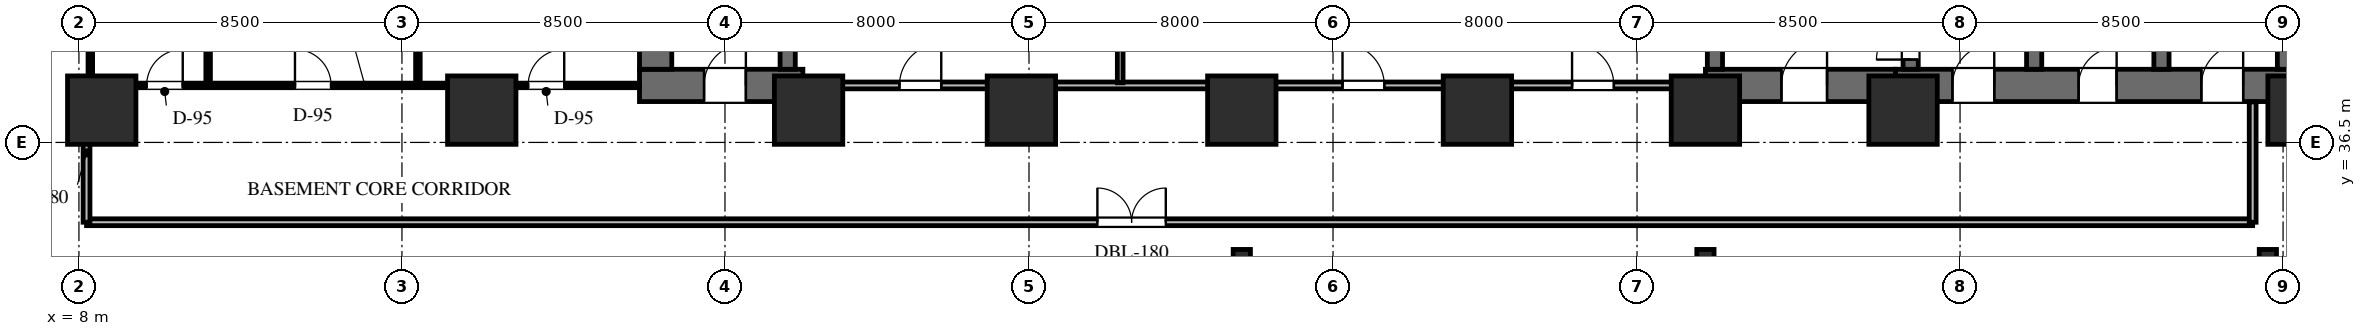
"""IFC4 building model, lengths in metres.
Left out: names, types, materials, properties, quantities, classifications, styles, units other than length and angle.
Written with IfcOpenShell. Run it as: python <this file> out.ifc"""

import sys

from ifc_helpers import new_model, si_unit, direction, frame, frame_2d, origin, origin_2d, place, context, subcontext, project, spatial, rectangle, i_section, extrude, element, fill, save


model = new_model("IFC4")
c1 = context("Model", 3, precision=1e-05, world=origin(), true_north=direction((0.0, 1.0)))
c2 = subcontext(c1, "Body", "Model", "MODEL_VIEW")
j1 = project(units=[si_unit("LENGTHUNIT", "METRE"), si_unit("PLANEANGLEUNIT", "RADIAN")], contexts=[c1])
p1 = place(None, origin())
s1 = spatial("IfcSite", under=j1, at=p1, CompositionType="ELEMENT")
p2 = place(p1, origin())
s2 = spatial("IfcBuilding", under=s1, at=p2, CompositionType="ELEMENT")
p3 = place(p2, frame((0.0, 0.0, -8.4)))
s3 = spatial("IfcBuildingStorey", under=s2, at=p3, CompositionType="ELEMENT", Elevation=-8.4)
p4 = place(p3, frame((55.8, 38.0, 0.0), z_axis=(0.0, 0.0, 1.0), x_axis=(1.0, 0.0, 0.0)))
e1 = element("IfcWall", 1, at=p4, inside=s3, PredefinedType="SHEAR", context=c2, shape_type="SweptSolid", body=[
    extrude(rectangle(XDim=10.9, YDim=0.85, at=frame_2d((5.45, 0.0))), origin(), (0.0, 0.0, 1.0), 4.2),
])
p5 = place(p4, frame((1.5, 0.0, 0.0)))
e2 = element("IfcOpeningElement", 2, at=p5, cuts=e1, PredefinedType="OPENING", context=c2, shape_type="SweptSolid", body=[
    extrude(rectangle(XDim=1.1, YDim=2.2, at=frame_2d((0.55, 1.1))), frame((0.0, 0.435, 0.0), z_axis=(0.0, -1.0, 0.0), x_axis=(1.0, 0.0, 0.0)), (0.0, 0.0, 1.0), 0.87),
])
p6 = place(p4, frame((4.82, 0.0, 0.0)))
e3 = element("IfcOpeningElement", 3, at=p6, cuts=e1, PredefinedType="OPENING", context=c2, shape_type="SweptSolid", body=[
    extrude(rectangle(XDim=1.0, YDim=2.15, at=frame_2d((0.5, 1.075))), frame((0.0, 0.435, 0.0), z_axis=(0.0, -1.0, 0.0), x_axis=(1.0, 0.0, 0.0)), (0.0, 0.0, 1.0), 0.87),
])
p7 = place(p4, frame((8.05, 0.0, 0.0)))
e4 = element("IfcOpeningElement", 4, at=p7, cuts=e1, PredefinedType="OPENING", context=c2, shape_type="SweptSolid", body=[
    extrude(rectangle(XDim=1.1, YDim=2.2, at=frame_2d((0.55, 1.1))), frame((0.0, 0.435, 0.0), z_axis=(0.0, -1.0, 0.0), x_axis=(1.0, 0.0, 0.0)), (0.0, 0.0, 1.0), 0.87),
])
p8 = place(p3, frame((66.275, 38.425, 0.0), z_axis=(0.0, 0.0, 1.0), x_axis=(0.0, 1.0, 0.0)))
e5 = element("IfcWall", 5, at=p8, inside=s3, PredefinedType="SHEAR", context=c2, shape_type="SweptSolid", body=[
    extrude(rectangle(XDim=8.325, YDim=0.85, at=frame_2d((4.163, 0.0))), origin(), (0.0, 0.0, 1.0), 4.2),
])
for number, where, z_axis, x_axis in (
    (6, (62.8, 38.425, 0.0), (0.0, 0.0, 1.0), (0.0, 1.0, 0.0)),
    (7, (59.45, 38.425, 0.0), (0.0, 0.0, 1.0), (0.0, 1.0, 0.0)),
):
    element("IfcWall", number, at=place(p3, frame(where, z_axis=z_axis, x_axis=x_axis)), inside=s3, PredefinedType="SHEAR", context=c2, shape_type="SweptSolid", body=[
        extrude(rectangle(XDim=8.325, YDim=0.4, at=frame_2d((4.163, 0.0))), origin(), (0.0, 0.0, 1.0), 4.2),
    ])
p9 = place(p3, frame((56.2, 38.425, 0.0), z_axis=(0.0, 0.0, 1.0), x_axis=(0.0, 1.0, 0.0)))
e8 = element("IfcWall", 8, at=p9, inside=s3, PredefinedType="SHEAR", context=c2, shape_type="SweptSolid", body=[
    extrude(rectangle(XDim=8.325, YDim=0.4, at=frame_2d((4.163, 0.0))), origin(), (0.0, 0.0, 1.0), 4.2),
])
p10 = place(p9, frame((0.255, 0.0, 0.0)))
e9 = element("IfcOpeningElement", 9, at=p10, cuts=e8, PredefinedType="OPENING", context=c2, shape_type="SweptSolid", body=[
    extrude(rectangle(XDim=0.9, YDim=2.15, at=frame_2d((0.45, 1.075))), frame((0.0, 0.21, 0.0), z_axis=(0.0, -1.0, 0.0), x_axis=(1.0, 0.0, 0.0)), (0.0, 0.0, 1.0), 0.42),
])
p11 = place(p3, frame((50.8, 38.0, 0.0), z_axis=(0.0, 0.0, 1.0), x_axis=(1.0, 0.0, 0.0)))
e10 = element("IfcWall", 10, at=p11, inside=s3, PredefinedType="SHEAR", context=c2, shape_type="SweptSolid", body=[
    extrude(rectangle(XDim=5.0, YDim=0.85, at=frame_2d((2.5, 0.0))), origin(), (0.0, 0.0, 1.0), 4.2),
])
p12 = place(p11, frame((2.0, 0.0, 0.0)))
e11 = element("IfcOpeningElement", 11, at=p12, cuts=e10, PredefinedType="OPENING", context=c2, shape_type="SweptSolid", body=[
    extrude(rectangle(XDim=1.2, YDim=2.2, at=frame_2d((0.6, 1.1))), frame((0.0, 0.435, 0.0), z_axis=(0.0, -1.0, 0.0), x_axis=(1.0, 0.0, 0.0)), (0.0, 0.0, 1.0), 0.87),
])
p13 = place(p3, frame((51.05, 38.425, 0.0), z_axis=(0.0, 0.0, 1.0), x_axis=(0.0, 1.0, 0.0)))
e12 = element("IfcWall", 12, at=p13, inside=s3, PredefinedType="SHEAR", context=c2, shape_type="SweptSolid", body=[
    extrude(rectangle(XDim=8.325, YDim=0.4, at=frame_2d((4.163, 0.0))), origin(), (0.0, 0.0, 1.0), 4.2),
])
p14 = place(p3, frame((22.75, 38.0, 0.0), z_axis=(0.0, 0.0, 1.0), x_axis=(1.0, 0.0, 0.0)))
e13 = element("IfcWall", 13, at=p14, inside=s3, PredefinedType="SHEAR", context=c2, shape_type="SweptSolid", body=[
    extrude(rectangle(XDim=4.3, YDim=0.85, at=frame_2d((2.15, 0.0))), origin(), (0.0, 0.0, 1.0), 4.2),
])
p15 = place(p14, frame((1.7, 0.0, 0.0)))
e14 = element("IfcOpeningElement", 14, at=p15, cuts=e13, PredefinedType="OPENING", context=c2, shape_type="SweptSolid", body=[
    extrude(rectangle(XDim=1.1, YDim=2.2, at=frame_2d((0.55, 1.1))), frame((0.0, 0.435, 0.0), z_axis=(0.0, -1.0, 0.0), x_axis=(1.0, 0.0, 0.0)), (0.0, 0.0, 1.0), 0.87),
])
p16 = place(p3, frame((23.175, 38.425, 0.0), z_axis=(0.0, 0.0, 1.0), x_axis=(0.0, 1.0, 0.0)))
e15 = element("IfcWall", 15, at=p16, inside=s3, PredefinedType="SHEAR", context=c2, shape_type="SweptSolid", body=[
    extrude(rectangle(XDim=8.325, YDim=0.85, at=frame_2d((4.163, 0.0))), origin(), (0.0, 0.0, 1.0), 4.2),
])
p17 = place(p3, frame((26.65, 38.425, 0.0), z_axis=(0.0, 0.0, 1.0), x_axis=(0.0, 1.0, 0.0)))
e16 = element("IfcWall", 16, at=p17, inside=s3, PredefinedType="SHEAR", context=c2, shape_type="SweptSolid", body=[
    extrude(rectangle(XDim=8.325, YDim=0.4, at=frame_2d((4.163, 0.0))), origin(), (0.0, 0.0, 1.0), 4.2),
])
for number, where, z_axis, x_axis in (
    (17, (38.6, 33.4, 0.0), (0.0, 0.0, 1.0), (1.0, 0.0, 0.0)),
    (18, (50.8, 33.4, 0.0), (0.0, 0.0, 1.0), (1.0, 0.0, 0.0)),
    (19, (65.6, 33.4, 0.0), (0.0, 0.0, 1.0), (1.0, 0.0, 0.0)),
):
    element("IfcColumn", number, at=place(p3, frame(where, z_axis=z_axis, x_axis=x_axis)), inside=s3, PredefinedType="COLUMN", context=c2, shape_type="SweptSolid", body=[
        extrude(i_section(OverallWidth=0.454, OverallDepth=0.569, WebThickness=0.078, FlangeThickness=0.125, FilletRadius=0.03, at=origin_2d()), origin(), (0.0, 0.0, 1.0), 4.2),
    ])
for number, where, z_axis, x_axis in (
    (20, (66.5, 37.35, 0.0), (0.0, 0.0, 1.0), (1.0, 0.0, 0.0)),
    (21, (56.0, 37.35, 0.0), (0.0, 0.0, 1.0), (1.0, 0.0, 0.0)),
    (22, (50.8, 37.35, 0.0), (0.0, 0.0, 1.0), (1.0, 0.0, 0.0)),
    (23, (44.8, 37.35, 0.0), (0.0, 0.0, 1.0), (1.0, 0.0, 0.0)),
    (24, (38.6, 37.35, 0.0), (0.0, 0.0, 1.0), (1.0, 0.0, 0.0)),
    (25, (32.8, 37.35, 0.0), (0.0, 0.0, 1.0), (1.0, 0.0, 0.0)),
    (26, (27.2, 37.35, 0.0), (0.0, 0.0, 1.0), (1.0, 0.0, 0.0)),
    (27, (18.6, 37.35, 0.0), (0.0, 0.0, 1.0), (1.0, 0.0, 0.0)),
    (28, (8.6, 37.35, 0.0), (0.0, 0.0, 1.0), (1.0, 0.0, 0.0)),
):
    element("IfcColumn", number, at=place(p3, frame(where, z_axis=z_axis, x_axis=x_axis)), inside=s3, PredefinedType="COLUMN", context=c2, shape_type="SweptSolid", body=[
        extrude(rectangle(XDim=1.8, YDim=1.8, at=origin_2d()), origin(), (0.0, 0.0, 1.0), 4.2),
    ])
p18 = place(p3, frame((45.05, 38.0, 0.0), z_axis=(0.0, 0.0, 1.0), x_axis=(1.0, 0.0, 0.0)))
e29 = element("IfcWall", 29, at=p18, inside=s3, PredefinedType="STANDARD", context=c2, shape_type="SweptSolid", body=[
    extrude(rectangle(XDim=5.75, YDim=0.18, at=frame_2d((2.875, 0.0))), origin(), (0.0, 0.0, 1.0), 2.952),
])
p19 = place(p18, frame((2.24, 0.0, 0.0)))
e30 = element("IfcOpeningElement", 30, at=p19, cuts=e29, PredefinedType="OPENING", context=c2, shape_type="SweptSolid", body=[
    extrude(rectangle(XDim=1.1, YDim=2.2, at=frame_2d((0.55, 1.1))), frame((0.0, 0.1, 0.0), z_axis=(0.0, -1.0, 0.0), x_axis=(1.0, 0.0, 0.0)), (0.0, 0.0, 1.0), 0.2),
])
p20 = place(p3, frame((27.05, 38.0, 0.0), z_axis=(0.0, 0.0, 1.0), x_axis=(1.0, 0.0, 0.0)))
e31 = element("IfcWall", 31, at=p20, inside=s3, PredefinedType="STANDARD", context=c2, shape_type="SweptSolid", body=[
    extrude(rectangle(XDim=18.0, YDim=0.18, at=frame_2d((9.0, 0.0))), origin(), (0.0, 0.0, 1.0), 2.952),
])
p21 = place(p20, frame((2.541, 0.0, 0.0)))
e32 = element("IfcOpeningElement", 32, at=p21, cuts=e31, PredefinedType="OPENING", context=c2, shape_type="SweptSolid", body=[
    extrude(rectangle(XDim=1.1, YDim=2.2, at=frame_2d((0.55, 1.1))), frame((0.0, 0.1, 0.0), z_axis=(0.0, -1.0, 0.0), x_axis=(1.0, 0.0, 0.0)), (0.0, 0.0, 1.0), 0.2),
])
p22 = place(p20, frame((14.2, 0.0, 0.0)))
e33 = element("IfcOpeningElement", 33, at=p22, cuts=e31, PredefinedType="OPENING", context=c2, shape_type="SweptSolid", body=[
    extrude(rectangle(XDim=1.1, YDim=2.2, at=frame_2d((0.55, 1.1))), frame((0.0, 0.1, 0.0), z_axis=(0.0, -1.0, 0.0), x_axis=(1.0, 0.0, 0.0)), (0.0, 0.0, 1.0), 0.2),
])
p23 = place(p3, frame((35.4, 38.068, 0.0), z_axis=(0.0, 0.0, 1.0), x_axis=(0.0, 1.0, 0.0)))
e34 = element("IfcWall", 34, at=p23, inside=s3, PredefinedType="PARTITIONING", context=c2, shape_type="SweptSolid", body=[
    extrude(rectangle(XDim=5.774, YDim=0.15, at=frame_2d((2.887, 0.0))), origin(), (0.0, 0.0, 1.0), 3.9),
])
p24 = place(p3, frame((8.2, 34.4, 0.0), z_axis=(0.0, 0.0, 1.0), x_axis=(1.0, 0.0, 0.0)))
e35 = element("IfcWall", 35, at=p24, inside=s3, PredefinedType="STANDARD", context=c2, shape_type="SweptSolid", body=[
    extrude(rectangle(XDim=57.0, YDim=0.18, at=frame_2d((28.5, 0.0))), origin(), (0.0, 0.0, 1.0), 2.952),
])
p25 = place(p24, frame((26.6, 0.0, 0.0)))
e36 = element("IfcOpeningElement", 36, at=p25, cuts=e35, PredefinedType="OPENING", context=c2, shape_type="SweptSolid", body=[
    extrude(rectangle(XDim=1.8, YDim=2.2, at=frame_2d((0.9, 1.1))), frame((0.0, 0.1, 0.0), z_axis=(0.0, -1.0, 0.0), x_axis=(1.0, 0.0, 0.0)), (0.0, 0.0, 1.0), 0.2),
])
p26 = place(p3, frame((8.2, 34.4, 0.0), z_axis=(0.0, 0.0, 1.0), x_axis=(0.0, 1.0, 0.0)))
e37 = element("IfcWall", 37, at=p26, inside=s3, PredefinedType="STANDARD", context=c2, shape_type="SweptSolid", body=[
    extrude(rectangle(XDim=3.65, YDim=0.18, at=frame_2d((1.825, 0.0))), origin(), (0.0, 0.0, 1.0), 2.952),
])
p27 = place(p3, frame((65.2, 34.4, 0.0), z_axis=(0.0, 0.0, 1.0), x_axis=(0.0, 1.0, 0.0)))
e38 = element("IfcWall", 38, at=p27, inside=s3, PredefinedType="STANDARD", context=c2, shape_type="SweptSolid", body=[
    extrude(rectangle(XDim=3.167, YDim=0.18, at=frame_2d((1.583, 0.0))), origin(), (0.0, 0.0, 1.0), 2.952),
])
p28 = place(p3, frame((8.3, 38.0, 0.0), z_axis=(0.0, 0.0, 1.0), x_axis=(1.0, 0.0, 0.0)))
e39 = element("IfcWall", 39, at=p28, inside=s3, PredefinedType="PARTITIONING", context=c2, shape_type="SweptSolid", body=[
    extrude(rectangle(XDim=14.45, YDim=0.12, at=frame_2d((7.225, 0.0))), origin(), (0.0, 0.0, 1.0), 2.952),
])
p29 = place(p28, frame((1.482, 0.0, 0.0)))
e40 = element("IfcOpeningElement", 40, at=p29, cuts=e39, PredefinedType="OPENING", context=c2, shape_type="SweptSolid", body=[
    extrude(rectangle(XDim=0.95, YDim=2.15, at=frame_2d((0.475, 1.075))), frame((0.0, 0.07, 0.0), z_axis=(0.0, -1.0, 0.0), x_axis=(1.0, 0.0, 0.0)), (0.0, 0.0, 1.0), 0.14),
])
p30 = place(p28, frame((5.385, 0.0, 0.0)))
e41 = element("IfcOpeningElement", 41, at=p30, cuts=e39, PredefinedType="OPENING", context=c2, shape_type="SweptSolid", body=[
    extrude(rectangle(XDim=0.95, YDim=2.15, at=frame_2d((0.475, 1.075))), frame((0.0, 0.07, 0.0), z_axis=(0.0, -1.0, 0.0), x_axis=(1.0, 0.0, 0.0)), (0.0, 0.0, 1.0), 0.14),
])
p31 = place(p28, frame((11.52, 0.0, 0.0)))
e42 = element("IfcOpeningElement", 42, at=p31, cuts=e39, PredefinedType="OPENING", context=c2, shape_type="SweptSolid", body=[
    extrude(rectangle(XDim=0.95, YDim=2.15, at=frame_2d((0.475, 1.075))), frame((0.0, 0.07, 0.0), z_axis=(0.0, -1.0, 0.0), x_axis=(1.0, 0.0, 0.0)), (0.0, 0.0, 1.0), 0.14),
])
p32 = place(p3, frame((8.3, 38.0, 0.0), z_axis=(0.0, 0.0, 1.0), x_axis=(0.0, 1.0, 0.0)))
e43 = element("IfcWall", 43, at=p32, inside=s3, PredefinedType="PARTITIONING", context=c2, shape_type="SweptSolid", body=[
    extrude(rectangle(XDim=10.8, YDim=0.12, at=frame_2d((5.4, 0.0))), origin(), (0.0, 0.0, 1.0), 2.952),
])
for number, where, z_axis, x_axis in (
    (44, (11.4, 38.068, 0.0), (0.0, 0.0, 1.0), (0.0, 1.0, 0.0)),
    (45, (16.92, 38.068, 0.0), (0.0, 0.0, 1.0), (0.0, 1.0, 0.0)),
):
    element("IfcWall", number, at=place(p3, frame(where, z_axis=z_axis, x_axis=x_axis)), inside=s3, PredefinedType="PARTITIONING", context=c2, shape_type="SweptSolid", body=[
        extrude(rectangle(XDim=10.664, YDim=0.12, at=frame_2d((5.332, 0.0))), origin(), (0.0, 0.0, 1.0), 2.952),
    ])
p33 = place(p5, origin())
e46 = element("IfcDoor", 46, at=p33, inside=s3, OperationType="SINGLE_SWING_RIGHT", PredefinedType="DOOR", context=c2, shape_type="SweptSolid", body=[
    extrude(rectangle(XDim=1.1, YDim=2.2, at=frame_2d((0.55, 1.1))), frame((0.0, 0.025, 0.0), z_axis=(0.0, -1.0, 0.0), x_axis=(1.0, 0.0, 0.0)), (0.0, 0.0, 1.0), 0.05),
])
fill(e2, e46)
p34 = place(p6, origin())
e47 = element("IfcDoor", 47, at=p34, inside=s3, OperationType="SINGLE_SWING_RIGHT", PredefinedType="DOOR", context=c2, shape_type="SweptSolid", body=[
    extrude(rectangle(XDim=1.0, YDim=2.15, at=frame_2d((0.5, 1.075))), frame((0.0, 0.025, 0.0), z_axis=(0.0, -1.0, 0.0), x_axis=(1.0, 0.0, 0.0)), (0.0, 0.0, 1.0), 0.05),
])
fill(e3, e47)
p35 = place(p7, origin())
e48 = element("IfcDoor", 48, at=p35, inside=s3, OperationType="SINGLE_SWING_RIGHT", PredefinedType="DOOR", context=c2, shape_type="SweptSolid", body=[
    extrude(rectangle(XDim=1.1, YDim=2.2, at=frame_2d((0.55, 1.1))), frame((0.0, 0.025, 0.0), z_axis=(0.0, -1.0, 0.0), x_axis=(1.0, 0.0, 0.0)), (0.0, 0.0, 1.0), 0.05),
])
fill(e4, e48)
p36 = place(p12, origin())
e49 = element("IfcDoor", 49, at=p36, inside=s3, OperationType="SINGLE_SWING_RIGHT", PredefinedType="DOOR", context=c2, shape_type="SweptSolid", body=[
    extrude(rectangle(XDim=1.2, YDim=2.2, at=frame_2d((0.6, 1.1))), frame((0.0, 0.025, 0.0), z_axis=(0.0, -1.0, 0.0), x_axis=(1.0, 0.0, 0.0)), (0.0, 0.0, 1.0), 0.05),
])
fill(e11, e49)
p37 = place(p10, origin())
e50 = element("IfcDoor", 50, at=p37, inside=s3, OperationType="SINGLE_SWING_LEFT", PredefinedType="DOOR", context=c2, shape_type="SweptSolid", body=[
    extrude(rectangle(XDim=0.9, YDim=2.15, at=frame_2d((0.45, 1.075))), frame((0.0, 0.025, 0.0), z_axis=(0.0, -1.0, 0.0), x_axis=(1.0, 0.0, 0.0)), (0.0, 0.0, 1.0), 0.05),
])
fill(e9, e50)
p38 = place(p15, origin())
e51 = element("IfcDoor", 51, at=p38, inside=s3, OperationType="SINGLE_SWING_RIGHT", PredefinedType="DOOR", context=c2, shape_type="SweptSolid", body=[
    extrude(rectangle(XDim=1.1, YDim=2.2, at=frame_2d((0.55, 1.1))), frame((0.0, 0.025, 0.0), z_axis=(0.0, -1.0, 0.0), x_axis=(1.0, 0.0, 0.0)), (0.0, 0.0, 1.0), 0.05),
])
fill(e14, e51)
p39 = place(p19, origin())
e52 = element("IfcDoor", 52, at=p39, inside=s3, OperationType="SINGLE_SWING_LEFT", PredefinedType="DOOR", context=c2, shape_type="SweptSolid", body=[
    extrude(rectangle(XDim=1.1, YDim=2.2, at=frame_2d((0.55, 1.1))), frame((0.0, 0.025, 0.0), z_axis=(0.0, -1.0, 0.0), x_axis=(1.0, 0.0, 0.0)), (0.0, 0.0, 1.0), 0.05),
])
fill(e30, e52)
p40 = place(p21, origin())
e53 = element("IfcDoor", 53, at=p40, inside=s3, OperationType="SINGLE_SWING_RIGHT", PredefinedType="DOOR", context=c2, shape_type="SweptSolid", body=[
    extrude(rectangle(XDim=1.1, YDim=2.2, at=frame_2d((0.55, 1.1))), frame((0.0, 0.025, 0.0), z_axis=(0.0, -1.0, 0.0), x_axis=(1.0, 0.0, 0.0)), (0.0, 0.0, 1.0), 0.05),
])
fill(e32, e53)
p41 = place(p22, origin())
e54 = element("IfcDoor", 54, at=p41, inside=s3, OperationType="SINGLE_SWING_LEFT", PredefinedType="DOOR", context=c2, shape_type="SweptSolid", body=[
    extrude(rectangle(XDim=1.1, YDim=2.2, at=frame_2d((0.55, 1.1))), frame((0.0, 0.025, 0.0), z_axis=(0.0, -1.0, 0.0), x_axis=(1.0, 0.0, 0.0)), (0.0, 0.0, 1.0), 0.05),
])
fill(e33, e54)
p42 = place(p25, origin())
e55 = element("IfcDoor", 55, at=p42, inside=s3, OperationType="DOUBLE_DOOR_SINGLE_SWING", PredefinedType="DOOR", context=c2, shape_type="SweptSolid", body=[
    extrude(rectangle(XDim=1.8, YDim=2.2, at=frame_2d((0.9, 1.1))), frame((0.0, 0.025, 0.0), z_axis=(0.0, -1.0, 0.0), x_axis=(1.0, 0.0, 0.0)), (0.0, 0.0, 1.0), 0.05),
])
fill(e36, e55)
p43 = place(p29, origin())
e56 = element("IfcDoor", 56, at=p43, inside=s3, OperationType="SINGLE_SWING_RIGHT", PredefinedType="DOOR", context=c2, shape_type="SweptSolid", body=[
    extrude(rectangle(XDim=0.95, YDim=2.15, at=frame_2d((0.475, 1.075))), frame((0.0, 0.025, 0.0), z_axis=(0.0, -1.0, 0.0), x_axis=(1.0, 0.0, 0.0)), (0.0, 0.0, 1.0), 0.05),
])
fill(e40, e56)
p44 = place(p30, origin())
e57 = element("IfcDoor", 57, at=p44, inside=s3, OperationType="SINGLE_SWING_LEFT", PredefinedType="DOOR", context=c2, shape_type="SweptSolid", body=[
    extrude(rectangle(XDim=0.95, YDim=2.15, at=frame_2d((0.475, 1.075))), frame((0.0, 0.025, 0.0), z_axis=(0.0, -1.0, 0.0), x_axis=(1.0, 0.0, 0.0)), (0.0, 0.0, 1.0), 0.05),
])
fill(e41, e57)
p45 = place(p31, origin())
e58 = element("IfcDoor", 58, at=p45, inside=s3, OperationType="SINGLE_SWING_RIGHT", PredefinedType="DOOR", context=c2, shape_type="SweptSolid", body=[
    extrude(rectangle(XDim=0.95, YDim=2.15, at=frame_2d((0.475, 1.075))), frame((0.0, 0.025, 0.0), z_axis=(0.0, -1.0, 0.0), x_axis=(1.0, 0.0, 0.0)), (0.0, 0.0, 1.0), 0.05),
])
fill(e42, e58)
save(model, sys.argv[1])
